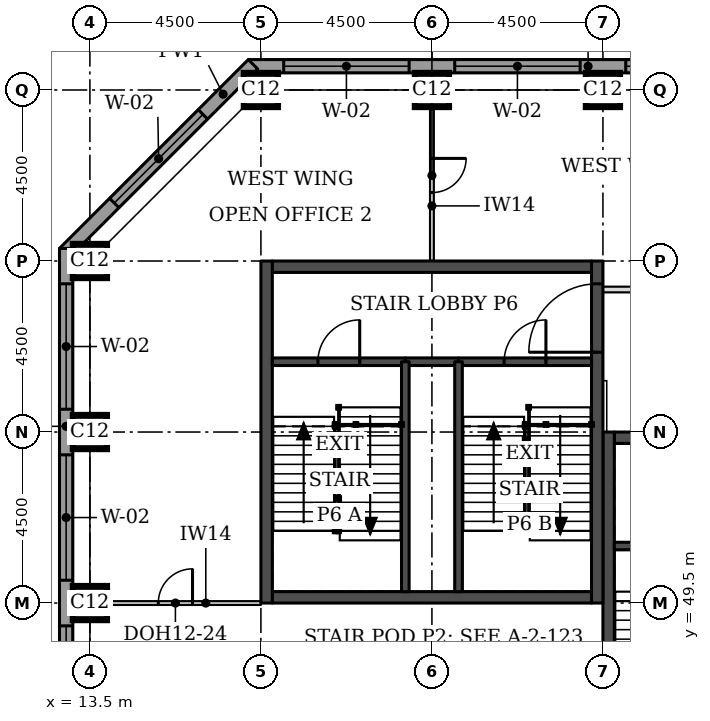
"""IFC4 building model, lengths in metres.
Left out: names, types, materials, properties, quantities, classifications, styles, units other than length and angle.
Written with IfcOpenShell. Run it as: python <this file> out.ifc"""

import sys

from ifc_helpers import new_model, si_unit, direction, frame, frame_2d, origin, origin_2d, place, context, subcontext, project, spatial, rectangle, extrude, element, fill, save


model = new_model("IFC4")
c1 = context("Model", 3, precision=1e-05, world=origin(), true_north=direction((0.0, 1.0)))
c2 = subcontext(c1, "Body", "Model", "MODEL_VIEW")
j1 = project(units=[si_unit("LENGTHUNIT", "METRE"), si_unit("PLANEANGLEUNIT", "RADIAN")], contexts=[c1])
p1 = place(None, origin())
s1 = spatial("IfcSite", under=j1, at=p1, CompositionType="ELEMENT")
p2 = place(p1, origin())
s2 = spatial("IfcBuilding", under=s1, at=p2, CompositionType="ELEMENT")
p3 = place(p2, frame((0.0, 0.0, 248.9)))
s3 = spatial("IfcBuildingStorey", under=s2, at=p3, CompositionType="ELEMENT", Elevation=248.9)
for number, where, z_axis, x_axis in (
    (1, (13.5, 49.5, 0.0), (0.0, 0.0, 1.0), (1.0, 0.0, 0.0)),
    (2, (13.5, 54.0, 0.0), (0.0, 0.0, 1.0), (1.0, 0.0, 0.0)),
    (3, (13.5, 58.5, 0.0), (0.0, 0.0, 1.0), (1.0, 0.0, 0.0)),
    (4, (18.0, 63.0, 0.0), (0.0, 0.0, 1.0), (1.0, 0.0, 0.0)),
    (5, (22.5, 63.0, 0.0), (0.0, 0.0, 1.0), (1.0, 0.0, 0.0)),
    (6, (27.0, 63.0, 0.0), (0.0, 0.0, 1.0), (1.0, 0.0, 0.0)),
):
    element("IfcColumn", number, at=place(p3, frame(where, z_axis=z_axis, x_axis=x_axis)), inside=s3, PredefinedType="COLUMN", context=c2, shape_type="SweptSolid", body=[
        extrude(rectangle(XDim=0.9, YDim=0.9, at=origin_2d()), origin(), (0.0, 0.0, 1.0), 3.7),
    ])
p4 = place(p3, frame((27.3, 53.85, 0.0), z_axis=(0.0, 0.0, 1.0), x_axis=(1.0, 0.0, 0.0)))
e7 = element("IfcWall", 7, at=p4, inside=s3, PredefinedType="SHEAR", context=c2, shape_type="SweptSolid", body=[
    extrude(rectangle(XDim=8.4, YDim=0.3, at=frame_2d((4.2, 0.0))), origin(), (0.0, 0.0, 1.0), 3.7),
])
p5 = place(p4, frame((6.4, 0.0, 0.0)))
e8 = element("IfcOpeningElement", 8, at=p5, cuts=e7, PredefinedType="OPENING", context=c2, shape_type="SweptSolid", body=[
    extrude(rectangle(XDim=1.1, YDim=2.1, at=frame_2d((0.55, 1.05))), frame((0.0, 0.16, 0.0), z_axis=(0.0, -1.0, 0.0), x_axis=(1.0, 0.0, 0.0)), (0.0, 0.0, 1.0), 0.32),
])
p6 = place(p3, frame((27.15, 45.0, 0.0), z_axis=(0.0, 0.0, 1.0), x_axis=(0.0, 1.0, 0.0)))
e9 = element("IfcWall", 9, at=p6, inside=s3, PredefinedType="SHEAR", context=c2, shape_type="SweptSolid", body=[
    extrude(rectangle(XDim=9.0, YDim=0.3, at=frame_2d((4.5, 0.0))), origin(), (0.0, 0.0, 1.0), 3.7),
])
p7 = place(p6, frame((0.4, 0.0, 0.0)))
e10 = element("IfcOpeningElement", 10, at=p7, cuts=e9, PredefinedType="OPENING", context=c2, shape_type="SweptSolid", body=[
    extrude(rectangle(XDim=1.1, YDim=2.1, at=frame_2d((0.55, 1.05))), frame((0.0, 0.16, 0.0), z_axis=(0.0, -1.0, 0.0), x_axis=(1.0, 0.0, 0.0)), (0.0, 0.0, 1.0), 0.32),
])
for number, where, z_axis, x_axis in (
    (11, (18.3, 49.65, 0.0), (0.0, 0.0, 1.0), (1.0, 0.0, 0.0)),
    (12, (18.3, 58.35, 0.0), (0.0, 0.0, 1.0), (1.0, 0.0, 0.0)),
):
    element("IfcWall", number, at=place(p3, frame(where, z_axis=z_axis, x_axis=x_axis)), inside=s3, PredefinedType="SHEAR", context=c2, shape_type="SweptSolid", body=[
        extrude(rectangle(XDim=8.4, YDim=0.3, at=frame_2d((4.2, 0.0))), origin(), (0.0, 0.0, 1.0), 3.7),
    ])
p8 = place(p3, frame((18.15, 49.5, 0.0), z_axis=(0.0, 0.0, 1.0), x_axis=(0.0, 1.0, 0.0)))
e13 = element("IfcWall", 13, at=p8, inside=s3, PredefinedType="SHEAR", context=c2, shape_type="SweptSolid", body=[
    extrude(rectangle(XDim=9.0, YDim=0.3, at=frame_2d((4.5, 0.0))), origin(), (0.0, 0.0, 1.0), 3.7),
])
p9 = place(p3, frame((26.85, 49.5, 0.0), z_axis=(0.0, 0.0, 1.0), x_axis=(0.0, 1.0, 0.0)))
e14 = element("IfcWall", 14, at=p9, inside=s3, PredefinedType="SHEAR", context=c2, shape_type="SweptSolid", body=[
    extrude(rectangle(XDim=9.0, YDim=0.3, at=frame_2d((4.5, 0.0))), origin(), (0.0, 0.0, 1.0), 3.7),
])
p10 = place(p9, frame((6.6, 0.0, 0.0)))
e15 = element("IfcOpeningElement", 15, at=p10, cuts=e14, PredefinedType="OPENING", context=c2, shape_type="SweptSolid", body=[
    extrude(rectangle(XDim=1.8, YDim=2.1, at=frame_2d((0.9, 1.05))), frame((0.0, 0.16, 0.0), z_axis=(0.0, -1.0, 0.0), x_axis=(1.0, 0.0, 0.0)), (0.0, 0.0, 1.0), 0.32),
])
p11 = place(p3, frame((35.55, 63.625, 0.0), z_axis=(0.0, 0.0, 1.0), x_axis=(-1.0, 0.0, 0.0)))
e16 = element("IfcWall", 16, at=p11, inside=s3, PredefinedType="STANDARD", context=c2, shape_type="SweptSolid", body=[
    extrude(rectangle(XDim=17.881, YDim=0.35, at=frame_2d((8.941, 0.0))), origin(), (0.0, 0.0, 1.0), 3.525),
])
p12 = place(p11, frame((0.5, 0.0, 0.9)))
e17 = element("IfcOpeningElement", 17, at=p12, cuts=e16, PredefinedType="OPENING", context=c2, shape_type="SweptSolid", body=[
    extrude(rectangle(XDim=3.3, YDim=1.9, at=frame_2d((1.65, 0.95))), frame((0.0, 0.185, 0.0), z_axis=(0.0, -1.0, 0.0), x_axis=(1.0, 0.0, 0.0)), (0.0, 0.0, 1.0), 0.37),
])
p13 = place(p11, frame((4.65, 0.0, 0.9)))
e18 = element("IfcOpeningElement", 18, at=p13, cuts=e16, PredefinedType="OPENING", context=c2, shape_type="SweptSolid", body=[
    extrude(rectangle(XDim=3.3, YDim=1.9, at=frame_2d((1.65, 0.95))), frame((0.0, 0.185, 0.0), z_axis=(0.0, -1.0, 0.0), x_axis=(1.0, 0.0, 0.0)), (0.0, 0.0, 1.0), 0.37),
])
p14 = place(p11, frame((9.15, 0.0, 0.9)))
e19 = element("IfcOpeningElement", 19, at=p14, cuts=e16, PredefinedType="OPENING", context=c2, shape_type="SweptSolid", body=[
    extrude(rectangle(XDim=3.3, YDim=1.9, at=frame_2d((1.65, 0.95))), frame((0.0, 0.185, 0.0), z_axis=(0.0, -1.0, 0.0), x_axis=(1.0, 0.0, 0.0)), (0.0, 0.0, 1.0), 0.37),
])
p15 = place(p11, frame((13.65, 0.0, 0.9)))
e20 = element("IfcOpeningElement", 20, at=p15, cuts=e16, PredefinedType="OPENING", context=c2, shape_type="SweptSolid", body=[
    extrude(rectangle(XDim=3.3, YDim=1.9, at=frame_2d((1.65, 0.95))), frame((0.0, 0.185, 0.0), z_axis=(0.0, -1.0, 0.0), x_axis=(1.0, 0.0, 0.0)), (0.0, 0.0, 1.0), 0.37),
])
p16 = place(p3, frame((17.792, 63.676, 0.0), z_axis=(0.0, 0.0, 1.0), x_axis=(-0.707106781187, -0.707106781187, 0.0)))
e21 = element("IfcWall", 21, at=p16, inside=s3, PredefinedType="STANDARD", context=c2, shape_type="SweptSolid", body=[
    extrude(rectangle(XDim=7.027, YDim=0.35, at=frame_2d((3.513, 0.0))), origin(), (0.0, 0.0, 1.0), 3.525),
])
p17 = place(p16, frame((1.863, 0.0, 0.9)))
e22 = element("IfcOpeningElement", 22, at=p17, cuts=e21, PredefinedType="OPENING", context=c2, shape_type="SweptSolid", body=[
    extrude(rectangle(XDim=3.3, YDim=1.9, at=frame_2d((1.65, 0.95))), frame((0.0, 0.185, 0.0), z_axis=(0.0, -1.0, 0.0), x_axis=(1.0, 0.0, 0.0)), (0.0, 0.0, 1.0), 0.37),
])
p18 = place(p3, frame((12.875, 58.831, 0.0), z_axis=(0.0, 0.0, 1.0), x_axis=(0.0, -1.0, 0.0)))
e23 = element("IfcWall", 23, at=p18, inside=s3, PredefinedType="STANDARD", context=c2, shape_type="SweptSolid", body=[
    extrude(rectangle(XDim=14.163, YDim=0.35, at=frame_2d((7.081, 0.0))), origin(), (0.0, 0.0, 1.0), 3.525),
])
p19 = place(p18, frame((0.931, 0.0, 0.9)))
e24 = element("IfcOpeningElement", 24, at=p19, cuts=e23, PredefinedType="OPENING", context=c2, shape_type="SweptSolid", body=[
    extrude(rectangle(XDim=3.3, YDim=1.9, at=frame_2d((1.65, 0.95))), frame((0.0, 0.185, 0.0), z_axis=(0.0, -1.0, 0.0), x_axis=(1.0, 0.0, 0.0)), (0.0, 0.0, 1.0), 0.37),
])
p20 = place(p18, frame((5.431, 0.0, 0.9)))
e25 = element("IfcOpeningElement", 25, at=p20, cuts=e23, PredefinedType="OPENING", context=c2, shape_type="SweptSolid", body=[
    extrude(rectangle(XDim=3.3, YDim=1.9, at=frame_2d((1.65, 0.95))), frame((0.0, 0.185, 0.0), z_axis=(0.0, -1.0, 0.0), x_axis=(1.0, 0.0, 0.0)), (0.0, 0.0, 1.0), 0.37),
])
p21 = place(p18, frame((9.931, 0.0, 0.9)))
e26 = element("IfcOpeningElement", 26, at=p21, cuts=e23, PredefinedType="OPENING", context=c2, shape_type="SweptSolid", body=[
    extrude(rectangle(XDim=3.3, YDim=1.9, at=frame_2d((1.65, 0.95))), frame((0.0, 0.185, 0.0), z_axis=(0.0, -1.0, 0.0), x_axis=(1.0, 0.0, 0.0)), (0.0, 0.0, 1.0), 0.37),
])
p22 = place(p3, frame((22.5, 63.0, 0.0), z_axis=(0.0, 0.0, 1.0), x_axis=(0.0, -1.0, 0.0)))
e27 = element("IfcWall", 27, at=p22, inside=s3, PredefinedType="PARTITIONING", context=c2, shape_type="SweptSolid", body=[
    extrude(rectangle(XDim=4.5, YDim=0.1, at=frame_2d((2.25, 0.0))), origin(), (0.0, 0.0, 1.0), 3.55),
])
p23 = place(p22, frame((1.8, 0.0, 0.0)))
e28 = element("IfcOpeningElement", 28, at=p23, cuts=e27, PredefinedType="OPENING", context=c2, shape_type="SweptSolid", body=[
    extrude(rectangle(XDim=0.9, YDim=2.1, at=frame_2d((0.45, 1.05))), frame((0.0, 0.06, 0.0), z_axis=(0.0, -1.0, 0.0), x_axis=(1.0, 0.0, 0.0)), (0.0, 0.0, 1.0), 0.12),
])
p24 = place(p3, frame((13.5, 49.5, 0.0), z_axis=(0.0, 0.0, 1.0), x_axis=(1.0, 0.0, 0.0)))
e29 = element("IfcWall", 29, at=p24, inside=s3, PredefinedType="PARTITIONING", context=c2, shape_type="SweptSolid", body=[
    extrude(rectangle(XDim=4.5, YDim=0.1, at=frame_2d((2.25, 0.0))), origin(), (0.0, 0.0, 1.0), 3.55),
])
p25 = place(p24, frame((1.8, 0.0, 0.0)))
e30 = element("IfcOpeningElement", 30, at=p25, cuts=e29, PredefinedType="OPENING", context=c2, shape_type="SweptSolid", body=[
    extrude(rectangle(XDim=0.9, YDim=2.1, at=frame_2d((0.45, 1.05))), frame((0.0, 0.06, 0.0), z_axis=(0.0, -1.0, 0.0), x_axis=(1.0, 0.0, 0.0)), (0.0, 0.0, 1.0), 0.12),
])
p26 = place(p3, frame((27.0, 57.75, 0.0), z_axis=(0.0, 0.0, 1.0), x_axis=(1.0, 0.0, 0.0)))
e31 = element("IfcWall", 31, at=p26, inside=s3, PredefinedType="PARTITIONING", context=c2, shape_type="SweptSolid", body=[
    extrude(rectangle(XDim=2.4, YDim=0.15, at=frame_2d((1.2, 0.0))), origin(), (0.0, 0.0, 1.0), 3.55),
])
p27 = place(p3, frame((27.3, 51.0, 0.0), z_axis=(0.0, 0.0, 1.0), x_axis=(1.0, 0.0, 0.0)))
e32 = element("IfcWall", 32, at=p27, inside=s3, PredefinedType="SOLIDWALL", context=c2, shape_type="SweptSolid", body=[
    extrude(rectangle(XDim=3.0, YDim=0.2, at=frame_2d((1.5, 0.0))), origin(), (0.0, 0.0, 1.0), 3.55),
])
p28 = place(p3, frame((21.8, 55.85, 0.0), z_axis=(0.0, 0.0, 1.0), x_axis=(1.0, 0.0, 0.0)))
e33 = element("IfcWall", 33, at=p28, inside=s3, PredefinedType="SOLIDWALL", context=c2, shape_type="SweptSolid", body=[
    extrude(rectangle(XDim=1.4, YDim=0.2, at=frame_2d((0.7, 0.0))), origin(), (0.0, 0.0, 1.0), 3.55),
])
p29 = place(p3, frame((18.3, 55.85, 0.0), z_axis=(0.0, 0.0, 1.0), x_axis=(1.0, 0.0, 0.0)))
e34 = element("IfcWall", 34, at=p29, inside=s3, PredefinedType="SOLIDWALL", context=c2, shape_type="SweptSolid", body=[
    extrude(rectangle(XDim=3.5, YDim=0.2, at=frame_2d((1.75, 0.0))), origin(), (0.0, 0.0, 1.0), 3.55),
])
p30 = place(p29, frame((1.2, 0.0, 0.0)))
e35 = element("IfcOpeningElement", 35, at=p30, cuts=e34, PredefinedType="OPENING", context=c2, shape_type="SweptSolid", body=[
    extrude(rectangle(XDim=1.1, YDim=2.1, at=frame_2d((0.55, 1.05))), frame((0.0, 0.11, 0.0), z_axis=(0.0, -1.0, 0.0), x_axis=(1.0, 0.0, 0.0)), (0.0, 0.0, 1.0), 0.22),
])
p31 = place(p3, frame((23.2, 55.85, 0.0), z_axis=(0.0, 0.0, 1.0), x_axis=(1.0, 0.0, 0.0)))
e36 = element("IfcWall", 36, at=p31, inside=s3, PredefinedType="SOLIDWALL", context=c2, shape_type="SweptSolid", body=[
    extrude(rectangle(XDim=3.5, YDim=0.2, at=frame_2d((1.75, 0.0))), origin(), (0.0, 0.0, 1.0), 3.55),
])
p32 = place(p31, frame((1.2, 0.0, 0.0)))
e37 = element("IfcOpeningElement", 37, at=p32, cuts=e36, PredefinedType="OPENING", context=c2, shape_type="SweptSolid", body=[
    extrude(rectangle(XDim=1.1, YDim=2.1, at=frame_2d((0.55, 1.05))), frame((0.0, 0.11, 0.0), z_axis=(0.0, -1.0, 0.0), x_axis=(1.0, 0.0, 0.0)), (0.0, 0.0, 1.0), 0.22),
])
for number, where, z_axis, x_axis in (
    (38, (21.8, 49.8, 0.0), (0.0, 0.0, 1.0), (0.0, 1.0, 0.0)),
    (39, (23.2, 49.8, 0.0), (0.0, 0.0, 1.0), (0.0, 1.0, 0.0)),
):
    element("IfcWall", number, at=place(p3, frame(where, z_axis=z_axis, x_axis=x_axis)), inside=s3, PredefinedType="SOLIDWALL", context=c2, shape_type="SweptSolid", body=[
        extrude(rectangle(XDim=6.05, YDim=0.2, at=frame_2d((3.025, 0.0))), origin(), (0.0, 0.0, 1.0), 3.55),
    ])
p33 = place(p13, origin())
e40 = element("IfcWindow", 40, at=p33, inside=s3, PartitioningType="SINGLE_PANEL", PredefinedType="WINDOW", context=c2, shape_type="SweptSolid", body=[
    extrude(rectangle(XDim=3.3, YDim=1.9, at=frame_2d((1.65, 0.95))), frame((0.0, 0.085, 0.0), z_axis=(0.0, -1.0, 0.0), x_axis=(1.0, 0.0, 0.0)), (0.0, 0.0, 1.0), 0.06),
])
fill(e18, e40)
p34 = place(p14, origin())
e41 = element("IfcWindow", 41, at=p34, inside=s3, PartitioningType="SINGLE_PANEL", PredefinedType="WINDOW", context=c2, shape_type="SweptSolid", body=[
    extrude(rectangle(XDim=3.3, YDim=1.9, at=frame_2d((1.65, 0.95))), frame((0.0, 0.085, 0.0), z_axis=(0.0, -1.0, 0.0), x_axis=(1.0, 0.0, 0.0)), (0.0, 0.0, 1.0), 0.06),
])
fill(e19, e41)
p35 = place(p15, origin())
e42 = element("IfcWindow", 42, at=p35, inside=s3, PartitioningType="SINGLE_PANEL", PredefinedType="WINDOW", context=c2, shape_type="SweptSolid", body=[
    extrude(rectangle(XDim=3.3, YDim=1.9, at=frame_2d((1.65, 0.95))), frame((0.0, 0.085, 0.0), z_axis=(0.0, -1.0, 0.0), x_axis=(1.0, 0.0, 0.0)), (0.0, 0.0, 1.0), 0.06),
])
fill(e20, e42)
p36 = place(p17, origin())
e43 = element("IfcWindow", 43, at=p36, inside=s3, PartitioningType="SINGLE_PANEL", PredefinedType="WINDOW", context=c2, shape_type="SweptSolid", body=[
    extrude(rectangle(XDim=3.3, YDim=1.9, at=frame_2d((1.65, 0.95))), frame((0.0, 0.085, 0.0), z_axis=(0.0, -1.0, 0.0), x_axis=(1.0, 0.0, 0.0)), (0.0, 0.0, 1.0), 0.06),
])
fill(e22, e43)
p37 = place(p19, origin())
e44 = element("IfcWindow", 44, at=p37, inside=s3, PartitioningType="SINGLE_PANEL", PredefinedType="WINDOW", context=c2, shape_type="SweptSolid", body=[
    extrude(rectangle(XDim=3.3, YDim=1.9, at=frame_2d((1.65, 0.95))), frame((0.0, 0.085, 0.0), z_axis=(0.0, -1.0, 0.0), x_axis=(1.0, 0.0, 0.0)), (0.0, 0.0, 1.0), 0.06),
])
fill(e24, e44)
p38 = place(p20, origin())
e45 = element("IfcWindow", 45, at=p38, inside=s3, PartitioningType="SINGLE_PANEL", PredefinedType="WINDOW", context=c2, shape_type="SweptSolid", body=[
    extrude(rectangle(XDim=3.3, YDim=1.9, at=frame_2d((1.65, 0.95))), frame((0.0, 0.085, 0.0), z_axis=(0.0, -1.0, 0.0), x_axis=(1.0, 0.0, 0.0)), (0.0, 0.0, 1.0), 0.06),
])
fill(e25, e45)
p39 = place(p21, origin())
e46 = element("IfcWindow", 46, at=p39, inside=s3, PartitioningType="SINGLE_PANEL", PredefinedType="WINDOW", context=c2, shape_type="SweptSolid", body=[
    extrude(rectangle(XDim=3.3, YDim=1.9, at=frame_2d((1.65, 0.95))), frame((0.0, 0.085, 0.0), z_axis=(0.0, -1.0, 0.0), x_axis=(1.0, 0.0, 0.0)), (0.0, 0.0, 1.0), 0.06),
])
fill(e26, e46)
p40 = place(p23, origin())
e47 = element("IfcDoor", 47, at=p40, inside=s3, OperationType="SINGLE_SWING_LEFT", PredefinedType="DOOR", context=c2, shape_type="SweptSolid", body=[
    extrude(rectangle(XDim=0.9, YDim=2.1, at=frame_2d((0.45, 1.05))), frame((0.0, 0.025, 0.0), z_axis=(0.0, -1.0, 0.0), x_axis=(1.0, 0.0, 0.0)), (0.0, 0.0, 1.0), 0.05),
])
fill(e28, e47)
p41 = place(p25, origin())
e48 = element("IfcDoor", 48, at=p41, inside=s3, OperationType="SINGLE_SWING_RIGHT", PredefinedType="DOOR", context=c2, shape_type="SweptSolid", body=[
    extrude(rectangle(XDim=0.9, YDim=2.1, at=frame_2d((0.45, 1.05))), frame((0.0, 0.025, 0.0), z_axis=(0.0, -1.0, 0.0), x_axis=(1.0, 0.0, 0.0)), (0.0, 0.0, 1.0), 0.05),
])
fill(e30, e48)
p42 = place(p30, origin())
e49 = element("IfcDoor", 49, at=p42, inside=s3, OperationType="SINGLE_SWING_RIGHT", PredefinedType="DOOR", context=c2, shape_type="SweptSolid", body=[
    extrude(rectangle(XDim=1.1, YDim=2.1, at=frame_2d((0.55, 1.05))), frame((0.0, 0.025, 0.0), z_axis=(0.0, -1.0, 0.0), x_axis=(1.0, 0.0, 0.0)), (0.0, 0.0, 1.0), 0.05),
])
fill(e35, e49)
p43 = place(p32, origin())
e50 = element("IfcDoor", 50, at=p43, inside=s3, OperationType="SINGLE_SWING_RIGHT", PredefinedType="DOOR", context=c2, shape_type="SweptSolid", body=[
    extrude(rectangle(XDim=1.1, YDim=2.1, at=frame_2d((0.55, 1.05))), frame((0.0, 0.025, 0.0), z_axis=(0.0, -1.0, 0.0), x_axis=(1.0, 0.0, 0.0)), (0.0, 0.0, 1.0), 0.05),
])
fill(e37, e50)
p44 = place(p10, origin())
e51 = element("IfcDoor", 51, at=p44, inside=s3, OperationType="SINGLE_SWING_LEFT", PredefinedType="DOOR", context=c2, shape_type="SweptSolid", body=[
    extrude(rectangle(XDim=1.8, YDim=2.1, at=frame_2d((0.9, 1.05))), frame((0.0, 0.025, 0.0), z_axis=(0.0, -1.0, 0.0), x_axis=(1.0, 0.0, 0.0)), (0.0, 0.0, 1.0), 0.05),
])
fill(e15, e51)
save(model, sys.argv[1])
